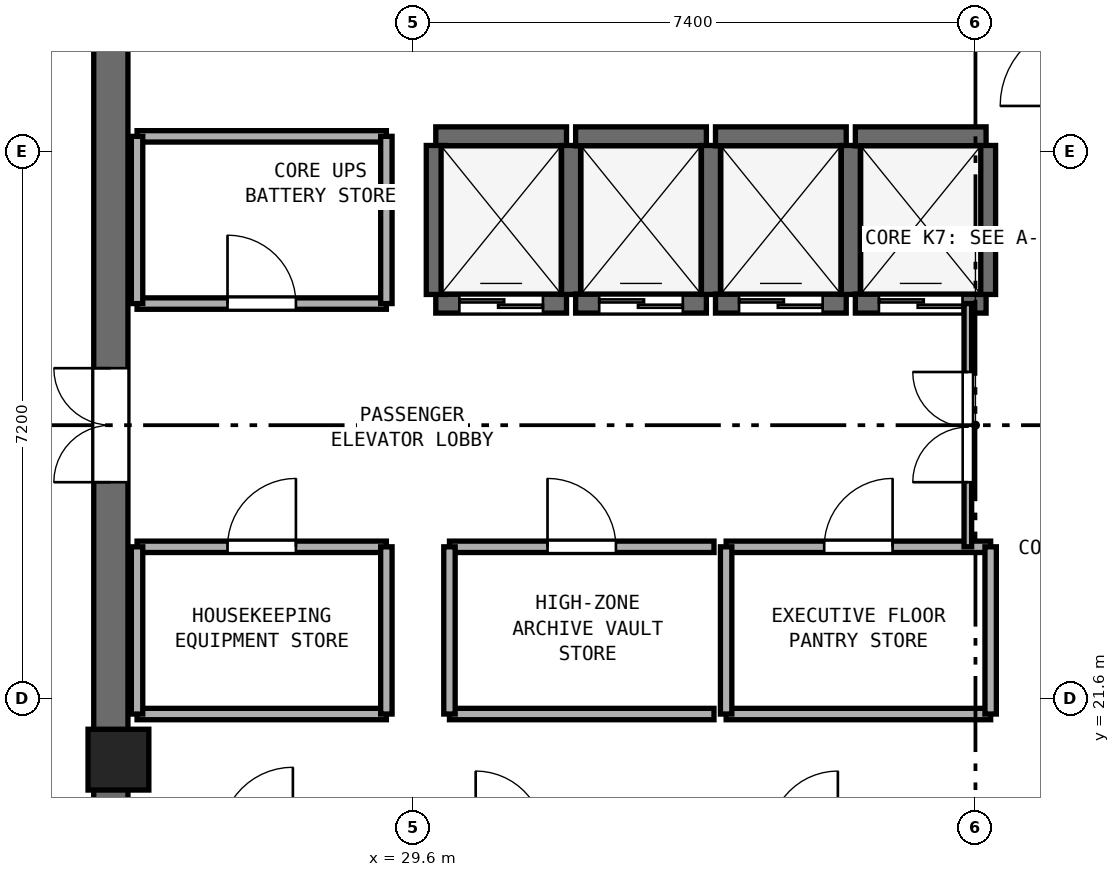
"""IFC4 building model, lengths in metres.
Left out: names, types, materials, properties, quantities, classifications, styles, units other than length and angle.
Written with IfcOpenShell. Run it as: python <this file> out.ifc"""

import sys

from ifc_helpers import new_model, si_unit, direction, frame, frame_2d, origin, origin_2d, place, context, subcontext, project, spatial, rectangle, extrude, element, fill, save


model = new_model("IFC4")
c1 = context("Model", 3, precision=1e-05, world=origin(), true_north=direction((0.0, 1.0)))
c2 = subcontext(c1, "Body", "Model", "MODEL_VIEW")
j1 = project(units=[si_unit("LENGTHUNIT", "METRE"), si_unit("PLANEANGLEUNIT", "RADIAN")], contexts=[c1])
p1 = place(None, origin())
s1 = spatial("IfcSite", under=j1, at=p1, CompositionType="ELEMENT")
p2 = place(p1, origin())
s2 = spatial("IfcBuilding", under=s1, at=p2, CompositionType="ELEMENT")
p3 = place(p2, frame((0.0, 0.0, 225.0)))
s3 = spatial("IfcBuildingStorey", under=s2, at=p3, CompositionType="ELEMENT", Elevation=225.0)
p4 = place(p3, frame((25.625, 17.45, 0.0), z_axis=(0.0, 0.0, 1.0), x_axis=(0.0, 1.0, 0.0)))
e1 = element("IfcWall", 1, at=p4, inside=s3, PredefinedType="SHEAR", context=c2, shape_type="SweptSolid", body=[
    extrude(rectangle(XDim=15.5, YDim=0.45, at=frame_2d((7.75, 0.0))), origin(), (0.0, 0.0, 1.0), 3.51),
])
p5 = place(p4, frame((7.0, 0.0, 0.0)))
e2 = element("IfcOpeningElement", 2, at=p5, cuts=e1, PredefinedType="OPENING", context=c2, shape_type="SweptSolid", body=[
    extrude(rectangle(XDim=1.5, YDim=2.15, at=frame_2d((0.75, 1.075))), frame((0.0, 0.235, 0.0), z_axis=(0.0, -1.0, 0.0), x_axis=(1.0, 0.0, 0.0)), (0.0, 0.0, 1.0), 0.47),
])
p6 = place(p3, frame((25.725, 20.8, 0.0), z_axis=(0.0, 0.0, 1.0), x_axis=(1.0, 0.0, 0.0)))
e3 = element("IfcColumn", 3, at=p6, inside=s3, PredefinedType="PILASTER", context=c2, shape_type="SweptSolid", body=[
    extrude(rectangle(XDim=0.8, YDim=0.8, at=origin_2d()), origin(), (0.0, 0.0, 1.0), 3.8),
])
p7 = place(p3, frame((29.9, 26.8, 0.0), z_axis=(0.0, 0.0, 1.0), x_axis=(1.0, 0.0, 0.0)))
e4 = element("IfcWall", 4, at=p7, inside=s3, PredefinedType="SHEAR", context=c2, shape_type="SweptSolid", body=[
    extrude(rectangle(XDim=1.72, YDim=0.25, at=frame_2d((0.86, 0.0))), origin(), (0.0, 0.0, 1.0), 3.51),
])
p8 = place(p7, frame((0.31, 0.0, 0.0)))
e5 = element("IfcOpeningElement", 5, at=p8, cuts=e4, PredefinedType="OPENING", context=c2, shape_type="SweptSolid", body=[
    extrude(rectangle(XDim=1.1, YDim=2.15, at=frame_2d((0.55, 1.075))), frame((0.0, 0.135, 0.0), z_axis=(0.0, -1.0, 0.0), x_axis=(1.0, 0.0, 0.0)), (0.0, 0.0, 1.0), 0.27),
])
p9 = place(p3, frame((29.9, 29.0, 0.0), z_axis=(0.0, 0.0, 1.0), x_axis=(1.0, 0.0, 0.0)))
e6 = element("IfcWall", 6, at=p9, inside=s3, PredefinedType="SHEAR", context=c2, shape_type="SweptSolid", body=[
    extrude(rectangle(XDim=1.72, YDim=0.25, at=frame_2d((0.86, 0.0))), origin(), (0.0, 0.0, 1.0), 3.51),
])
for number, where, z_axis, x_axis in (
    (7, (29.9, 26.92, 0.0), (0.0, 0.0, 1.0), (0.0, 1.0, 0.0)),
    (8, (31.68, 26.92, 0.0), (0.0, 0.0, 1.0), (0.0, 1.0, 0.0)),
):
    element("IfcWall", number, at=place(p3, frame(where, z_axis=z_axis, x_axis=x_axis)), inside=s3, PredefinedType="SHEAR", context=c2, shape_type="SweptSolid", body=[
        extrude(rectangle(XDim=1.96, YDim=0.25, at=frame_2d((0.98, 0.0))), origin(), (0.0, 0.0, 1.0), 3.51),
    ])
p10 = place(p3, frame((31.74, 26.8, 0.0), z_axis=(0.0, 0.0, 1.0), x_axis=(1.0, 0.0, 0.0)))
e9 = element("IfcWall", 9, at=p10, inside=s3, PredefinedType="SHEAR", context=c2, shape_type="SweptSolid", body=[
    extrude(rectangle(XDim=1.72, YDim=0.25, at=frame_2d((0.86, 0.0))), origin(), (0.0, 0.0, 1.0), 3.51),
])
p11 = place(p10, frame((0.31, 0.0, 0.0)))
e10 = element("IfcOpeningElement", 10, at=p11, cuts=e9, PredefinedType="OPENING", context=c2, shape_type="SweptSolid", body=[
    extrude(rectangle(XDim=1.1, YDim=2.15, at=frame_2d((0.55, 1.075))), frame((0.0, 0.135, 0.0), z_axis=(0.0, -1.0, 0.0), x_axis=(1.0, 0.0, 0.0)), (0.0, 0.0, 1.0), 0.27),
])
p12 = place(p3, frame((31.74, 29.0, 0.0), z_axis=(0.0, 0.0, 1.0), x_axis=(1.0, 0.0, 0.0)))
e11 = element("IfcWall", 11, at=p12, inside=s3, PredefinedType="SHEAR", context=c2, shape_type="SweptSolid", body=[
    extrude(rectangle(XDim=1.72, YDim=0.25, at=frame_2d((0.86, 0.0))), origin(), (0.0, 0.0, 1.0), 3.51),
])
p13 = place(p3, frame((33.52, 26.92, 0.0), z_axis=(0.0, 0.0, 1.0), x_axis=(0.0, 1.0, 0.0)))
e12 = element("IfcWall", 12, at=p13, inside=s3, PredefinedType="SHEAR", context=c2, shape_type="SweptSolid", body=[
    extrude(rectangle(XDim=1.96, YDim=0.25, at=frame_2d((0.98, 0.0))), origin(), (0.0, 0.0, 1.0), 3.51),
])
p14 = place(p3, frame((33.58, 26.8, 0.0), z_axis=(0.0, 0.0, 1.0), x_axis=(1.0, 0.0, 0.0)))
e13 = element("IfcWall", 13, at=p14, inside=s3, PredefinedType="SHEAR", context=c2, shape_type="SweptSolid", body=[
    extrude(rectangle(XDim=1.72, YDim=0.25, at=frame_2d((0.86, 0.0))), origin(), (0.0, 0.0, 1.0), 3.51),
])
p15 = place(p14, frame((0.31, 0.0, 0.0)))
e14 = element("IfcOpeningElement", 14, at=p15, cuts=e13, PredefinedType="OPENING", context=c2, shape_type="SweptSolid", body=[
    extrude(rectangle(XDim=1.1, YDim=2.15, at=frame_2d((0.55, 1.075))), frame((0.0, 0.135, 0.0), z_axis=(0.0, -1.0, 0.0), x_axis=(1.0, 0.0, 0.0)), (0.0, 0.0, 1.0), 0.27),
])
p16 = place(p3, frame((33.58, 29.0, 0.0), z_axis=(0.0, 0.0, 1.0), x_axis=(1.0, 0.0, 0.0)))
e15 = element("IfcWall", 15, at=p16, inside=s3, PredefinedType="SHEAR", context=c2, shape_type="SweptSolid", body=[
    extrude(rectangle(XDim=1.72, YDim=0.25, at=frame_2d((0.86, 0.0))), origin(), (0.0, 0.0, 1.0), 3.51),
])
p17 = place(p3, frame((35.36, 26.92, 0.0), z_axis=(0.0, 0.0, 1.0), x_axis=(0.0, 1.0, 0.0)))
e16 = element("IfcWall", 16, at=p17, inside=s3, PredefinedType="SHEAR", context=c2, shape_type="SweptSolid", body=[
    extrude(rectangle(XDim=1.96, YDim=0.25, at=frame_2d((0.98, 0.0))), origin(), (0.0, 0.0, 1.0), 3.51),
])
p18 = place(p3, frame((35.42, 26.8, 0.0), z_axis=(0.0, 0.0, 1.0), x_axis=(1.0, 0.0, 0.0)))
e17 = element("IfcWall", 17, at=p18, inside=s3, PredefinedType="SHEAR", context=c2, shape_type="SweptSolid", body=[
    extrude(rectangle(XDim=1.72, YDim=0.25, at=frame_2d((0.86, 0.0))), origin(), (0.0, 0.0, 1.0), 3.51),
])
p19 = place(p18, frame((0.31, 0.0, 0.0)))
e18 = element("IfcOpeningElement", 18, at=p19, cuts=e17, PredefinedType="OPENING", context=c2, shape_type="SweptSolid", body=[
    extrude(rectangle(XDim=1.1, YDim=2.15, at=frame_2d((0.55, 1.075))), frame((0.0, 0.135, 0.0), z_axis=(0.0, -1.0, 0.0), x_axis=(1.0, 0.0, 0.0)), (0.0, 0.0, 1.0), 0.27),
])
p20 = place(p3, frame((35.42, 29.0, 0.0), z_axis=(0.0, 0.0, 1.0), x_axis=(1.0, 0.0, 0.0)))
e19 = element("IfcWall", 19, at=p20, inside=s3, PredefinedType="SHEAR", context=c2, shape_type="SweptSolid", body=[
    extrude(rectangle(XDim=1.72, YDim=0.25, at=frame_2d((0.86, 0.0))), origin(), (0.0, 0.0, 1.0), 3.51),
])
p21 = place(p3, frame((37.14, 26.92, 0.0), z_axis=(0.0, 0.0, 1.0), x_axis=(0.0, 1.0, 0.0)))
e20 = element("IfcWall", 20, at=p21, inside=s3, PredefinedType="SHEAR", context=c2, shape_type="SweptSolid", body=[
    extrude(rectangle(XDim=1.96, YDim=0.25, at=frame_2d((0.98, 0.0))), origin(), (0.0, 0.0, 1.0), 3.51),
])
p22 = place(p3, frame((25.97, 26.8, 0.0), z_axis=(0.0, 0.0, 1.0), x_axis=(1.0, 0.0, 0.0)))
e21 = element("IfcWall", 21, at=p22, inside=s3, PredefinedType="PARTITIONING", context=c2, shape_type="SweptSolid", body=[
    extrude(rectangle(XDim=3.28, YDim=0.15, at=frame_2d((1.64, 0.0))), origin(), (0.0, 0.0, 1.0), 3.51),
])
p23 = place(p22, frame((1.19, 0.0, 0.0)))
e22 = element("IfcOpeningElement", 22, at=p23, cuts=e21, PredefinedType="OPENING", context=c2, shape_type="SweptSolid", body=[
    extrude(rectangle(XDim=0.9, YDim=2.1, at=frame_2d((0.45, 1.05))), frame((0.0, 0.085, 0.0), z_axis=(0.0, -1.0, 0.0), x_axis=(1.0, 0.0, 0.0)), (0.0, 0.0, 1.0), 0.17),
])
p24 = place(p3, frame((25.97, 29.0, 0.0), z_axis=(0.0, 0.0, 1.0), x_axis=(1.0, 0.0, 0.0)))
e23 = element("IfcWall", 23, at=p24, inside=s3, PredefinedType="PARTITIONING", context=c2, shape_type="SweptSolid", body=[
    extrude(rectangle(XDim=3.28, YDim=0.15, at=frame_2d((1.64, 0.0))), origin(), (0.0, 0.0, 1.0), 3.51),
])
p25 = place(p3, frame((25.97, 26.8, 0.0), z_axis=(0.0, 0.0, 1.0), x_axis=(0.0, 1.0, 0.0)))
e24 = element("IfcWall", 24, at=p25, inside=s3, PredefinedType="PARTITIONING", context=c2, shape_type="SweptSolid", body=[
    extrude(rectangle(XDim=2.2, YDim=0.15, at=frame_2d((1.1, 0.0))), origin(), (0.0, 0.0, 1.0), 2.61),
])
p26 = place(p3, frame((29.25, 26.8, 0.0), z_axis=(0.0, 0.0, 1.0), x_axis=(0.0, 1.0, 0.0)))
e25 = element("IfcWall", 25, at=p26, inside=s3, PredefinedType="PARTITIONING", context=c2, shape_type="SweptSolid", body=[
    extrude(rectangle(XDim=2.2, YDim=0.15, at=frame_2d((1.1, 0.0))), origin(), (0.0, 0.0, 1.0), 3.51),
])
p27 = place(p3, frame((25.97, 21.4, 0.0), z_axis=(0.0, 0.0, 1.0), x_axis=(1.0, 0.0, 0.0)))
e26 = element("IfcWall", 26, at=p27, inside=s3, PredefinedType="PARTITIONING", context=c2, shape_type="SweptSolid", body=[
    extrude(rectangle(XDim=3.28, YDim=0.15, at=frame_2d((1.64, 0.0))), origin(), (0.0, 0.0, 1.0), 3.51),
])
p28 = place(p3, frame((25.97, 23.6, 0.0), z_axis=(0.0, 0.0, 1.0), x_axis=(1.0, 0.0, 0.0)))
e27 = element("IfcWall", 27, at=p28, inside=s3, PredefinedType="PARTITIONING", context=c2, shape_type="SweptSolid", body=[
    extrude(rectangle(XDim=3.28, YDim=0.15, at=frame_2d((1.64, 0.0))), origin(), (0.0, 0.0, 1.0), 3.51),
])
p29 = place(p28, frame((1.19, 0.0, 0.0)))
e28 = element("IfcOpeningElement", 28, at=p29, cuts=e27, PredefinedType="OPENING", context=c2, shape_type="SweptSolid", body=[
    extrude(rectangle(XDim=0.9, YDim=2.1, at=frame_2d((0.45, 1.05))), frame((0.0, 0.085, 0.0), z_axis=(0.0, -1.0, 0.0), x_axis=(1.0, 0.0, 0.0)), (0.0, 0.0, 1.0), 0.17),
])
p30 = place(p3, frame((25.97, 21.4, 0.0), z_axis=(0.0, 0.0, 1.0), x_axis=(0.0, 1.0, 0.0)))
e29 = element("IfcWall", 29, at=p30, inside=s3, PredefinedType="PARTITIONING", context=c2, shape_type="SweptSolid", body=[
    extrude(rectangle(XDim=2.2, YDim=0.15, at=frame_2d((1.1, 0.0))), origin(), (0.0, 0.0, 1.0), 2.61),
])
p31 = place(p3, frame((29.25, 21.4, 0.0), z_axis=(0.0, 0.0, 1.0), x_axis=(0.0, 1.0, 0.0)))
e30 = element("IfcWall", 30, at=p31, inside=s3, PredefinedType="PARTITIONING", context=c2, shape_type="SweptSolid", body=[
    extrude(rectangle(XDim=2.2, YDim=0.15, at=frame_2d((1.1, 0.0))), origin(), (0.0, 0.0, 1.0), 3.51),
])
p32 = place(p3, frame((30.08, 21.4, 0.0), z_axis=(0.0, 0.0, 1.0), x_axis=(1.0, 0.0, 0.0)))
e31 = element("IfcWall", 31, at=p32, inside=s3, PredefinedType="PARTITIONING", context=c2, shape_type="SweptSolid", body=[
    extrude(rectangle(XDim=3.48, YDim=0.15, at=frame_2d((1.74, 0.0))), origin(), (0.0, 0.0, 1.0), 3.51),
])
p33 = place(p3, frame((30.08, 23.6, 0.0), z_axis=(0.0, 0.0, 1.0), x_axis=(1.0, 0.0, 0.0)))
e32 = element("IfcWall", 32, at=p33, inside=s3, PredefinedType="PARTITIONING", context=c2, shape_type="SweptSolid", body=[
    extrude(rectangle(XDim=3.48, YDim=0.15, at=frame_2d((1.74, 0.0))), origin(), (0.0, 0.0, 1.0), 3.51),
])
p34 = place(p33, frame((1.29, 0.0, 0.0)))
e33 = element("IfcOpeningElement", 33, at=p34, cuts=e32, PredefinedType="OPENING", context=c2, shape_type="SweptSolid", body=[
    extrude(rectangle(XDim=0.9, YDim=2.1, at=frame_2d((0.45, 1.05))), frame((0.0, 0.085, 0.0), z_axis=(0.0, -1.0, 0.0), x_axis=(1.0, 0.0, 0.0)), (0.0, 0.0, 1.0), 0.17),
])
p35 = place(p3, frame((30.08, 21.4, 0.0), z_axis=(0.0, 0.0, 1.0), x_axis=(0.0, 1.0, 0.0)))
e34 = element("IfcWall", 34, at=p35, inside=s3, PredefinedType="PARTITIONING", context=c2, shape_type="SweptSolid", body=[
    extrude(rectangle(XDim=2.2, YDim=0.15, at=frame_2d((1.1, 0.0))), origin(), (0.0, 0.0, 1.0), 3.51),
])
p36 = place(p3, frame((33.72, 21.4, 0.0), z_axis=(0.0, 0.0, 1.0), x_axis=(1.0, 0.0, 0.0)))
e35 = element("IfcWall", 35, at=p36, inside=s3, PredefinedType="PARTITIONING", context=c2, shape_type="SweptSolid", body=[
    extrude(rectangle(XDim=3.48, YDim=0.15, at=frame_2d((1.74, 0.0))), origin(), (0.0, 0.0, 1.0), 3.51),
])
p37 = place(p3, frame((33.72, 23.6, 0.0), z_axis=(0.0, 0.0, 1.0), x_axis=(1.0, 0.0, 0.0)))
e36 = element("IfcWall", 36, at=p37, inside=s3, PredefinedType="PARTITIONING", context=c2, shape_type="SweptSolid", body=[
    extrude(rectangle(XDim=3.48, YDim=0.15, at=frame_2d((1.74, 0.0))), origin(), (0.0, 0.0, 1.0), 3.51),
])
p38 = place(p37, frame((1.29, 0.0, 0.0)))
e37 = element("IfcOpeningElement", 37, at=p38, cuts=e36, PredefinedType="OPENING", context=c2, shape_type="SweptSolid", body=[
    extrude(rectangle(XDim=0.9, YDim=2.1, at=frame_2d((0.45, 1.05))), frame((0.0, 0.085, 0.0), z_axis=(0.0, -1.0, 0.0), x_axis=(1.0, 0.0, 0.0)), (0.0, 0.0, 1.0), 0.17),
])
for number, where, z_axis, x_axis in (
    (38, (33.72, 21.4, 0.0), (0.0, 0.0, 1.0), (0.0, 1.0, 0.0)),
    (39, (37.2, 21.4, 0.0), (0.0, 0.0, 1.0), (0.0, 1.0, 0.0)),
):
    element("IfcWall", number, at=place(p3, frame(where, z_axis=z_axis, x_axis=x_axis)), inside=s3, PredefinedType="PARTITIONING", context=c2, shape_type="SweptSolid", body=[
        extrude(rectangle(XDim=2.2, YDim=0.15, at=frame_2d((1.1, 0.0))), origin(), (0.0, 0.0, 1.0), 3.51),
    ])
p39 = place(p3, frame((36.9, 23.6, 0.0), z_axis=(0.0, 0.0, 1.0), x_axis=(0.0, 1.0, 0.0)))
e40 = element("IfcWall", 40, at=p39, inside=s3, PredefinedType="PARTITIONING", context=c2, shape_type="SweptSolid", body=[
    extrude(rectangle(XDim=3.2, YDim=0.1, at=frame_2d((1.6, 0.0))), origin(), (0.0, 0.0, 1.0), 3.51),
])
p40 = place(p39, frame((0.85, 0.0, 0.0)))
e41 = element("IfcOpeningElement", 41, at=p40, cuts=e40, PredefinedType="OPENING", context=c2, shape_type="SweptSolid", body=[
    extrude(rectangle(XDim=1.45, YDim=2.12, at=frame_2d((0.725, 1.06))), frame((0.0, 0.06, 0.0), z_axis=(0.0, -1.0, 0.0), x_axis=(1.0, 0.0, 0.0)), (0.0, 0.0, 1.0), 0.12),
])
p41 = place(p8, origin())
e42 = element("IfcDoor", 42, at=p41, inside=s3, OperationType="DOUBLE_DOOR_SLIDING", PredefinedType="DOOR", context=c2, shape_type="SweptSolid", body=[
    extrude(rectangle(XDim=1.1, YDim=2.15, at=frame_2d((0.55, 1.075))), frame((0.0, 0.025, 0.0), z_axis=(0.0, -1.0, 0.0), x_axis=(1.0, 0.0, 0.0)), (0.0, 0.0, 1.0), 0.05),
])
fill(e5, e42)
p42 = place(p11, origin())
e43 = element("IfcDoor", 43, at=p42, inside=s3, OperationType="DOUBLE_DOOR_SLIDING", PredefinedType="DOOR", context=c2, shape_type="SweptSolid", body=[
    extrude(rectangle(XDim=1.1, YDim=2.15, at=frame_2d((0.55, 1.075))), frame((0.0, 0.025, 0.0), z_axis=(0.0, -1.0, 0.0), x_axis=(1.0, 0.0, 0.0)), (0.0, 0.0, 1.0), 0.05),
])
fill(e10, e43)
p43 = place(p15, origin())
e44 = element("IfcDoor", 44, at=p43, inside=s3, OperationType="DOUBLE_DOOR_SLIDING", PredefinedType="DOOR", context=c2, shape_type="SweptSolid", body=[
    extrude(rectangle(XDim=1.1, YDim=2.15, at=frame_2d((0.55, 1.075))), frame((0.0, 0.025, 0.0), z_axis=(0.0, -1.0, 0.0), x_axis=(1.0, 0.0, 0.0)), (0.0, 0.0, 1.0), 0.05),
])
fill(e14, e44)
p44 = place(p19, origin())
e45 = element("IfcDoor", 45, at=p44, inside=s3, OperationType="DOUBLE_DOOR_SLIDING", PredefinedType="DOOR", context=c2, shape_type="SweptSolid", body=[
    extrude(rectangle(XDim=1.1, YDim=2.15, at=frame_2d((0.55, 1.075))), frame((0.0, 0.025, 0.0), z_axis=(0.0, -1.0, 0.0), x_axis=(1.0, 0.0, 0.0)), (0.0, 0.0, 1.0), 0.05),
])
fill(e18, e45)
p45 = place(p5, origin())
e46 = element("IfcDoor", 46, at=p45, inside=s3, OperationType="DOUBLE_DOOR_SINGLE_SWING", PredefinedType="DOOR", context=c2, shape_type="SweptSolid", body=[
    extrude(rectangle(XDim=1.5, YDim=2.15, at=frame_2d((0.75, 1.075))), frame((0.0, 0.025, 0.0), z_axis=(0.0, -1.0, 0.0), x_axis=(1.0, 0.0, 0.0)), (0.0, 0.0, 1.0), 0.05),
])
fill(e2, e46)
p46 = place(p23, origin())
e47 = element("IfcDoor", 47, at=p46, inside=s3, OperationType="SINGLE_SWING_LEFT", PredefinedType="DOOR", context=c2, shape_type="SweptSolid", body=[
    extrude(rectangle(XDim=0.9, YDim=2.1, at=frame_2d((0.45, 1.05))), frame((0.0, 0.025, 0.0), z_axis=(0.0, -1.0, 0.0), x_axis=(1.0, 0.0, 0.0)), (0.0, 0.0, 1.0), 0.05),
])
fill(e22, e47)
p47 = place(p29, origin())
e48 = element("IfcDoor", 48, at=p47, inside=s3, OperationType="SINGLE_SWING_RIGHT", PredefinedType="DOOR", context=c2, shape_type="SweptSolid", body=[
    extrude(rectangle(XDim=0.9, YDim=2.1, at=frame_2d((0.45, 1.05))), frame((0.0, 0.025, 0.0), z_axis=(0.0, -1.0, 0.0), x_axis=(1.0, 0.0, 0.0)), (0.0, 0.0, 1.0), 0.05),
])
fill(e28, e48)
p48 = place(p34, origin())
e49 = element("IfcDoor", 49, at=p48, inside=s3, OperationType="SINGLE_SWING_LEFT", PredefinedType="DOOR", context=c2, shape_type="SweptSolid", body=[
    extrude(rectangle(XDim=0.9, YDim=2.1, at=frame_2d((0.45, 1.05))), frame((0.0, 0.025, 0.0), z_axis=(0.0, -1.0, 0.0), x_axis=(1.0, 0.0, 0.0)), (0.0, 0.0, 1.0), 0.05),
])
fill(e33, e49)
p49 = place(p38, origin())
e50 = element("IfcDoor", 50, at=p49, inside=s3, OperationType="SINGLE_SWING_RIGHT", PredefinedType="DOOR", context=c2, shape_type="SweptSolid", body=[
    extrude(rectangle(XDim=0.9, YDim=2.1, at=frame_2d((0.45, 1.05))), frame((0.0, 0.025, 0.0), z_axis=(0.0, -1.0, 0.0), x_axis=(1.0, 0.0, 0.0)), (0.0, 0.0, 1.0), 0.05),
])
fill(e37, e50)
p50 = place(p40, origin())
e51 = element("IfcDoor", 51, at=p50, inside=s3, OperationType="DOUBLE_DOOR_SINGLE_SWING", PredefinedType="DOOR", context=c2, shape_type="SweptSolid", body=[
    extrude(rectangle(XDim=1.45, YDim=2.12, at=frame_2d((0.725, 1.06))), frame((0.0, 0.025, 0.0), z_axis=(0.0, -1.0, 0.0), x_axis=(1.0, 0.0, 0.0)), (0.0, 0.0, 1.0), 0.05),
])
fill(e41, e51)
save(model, sys.argv[1])
